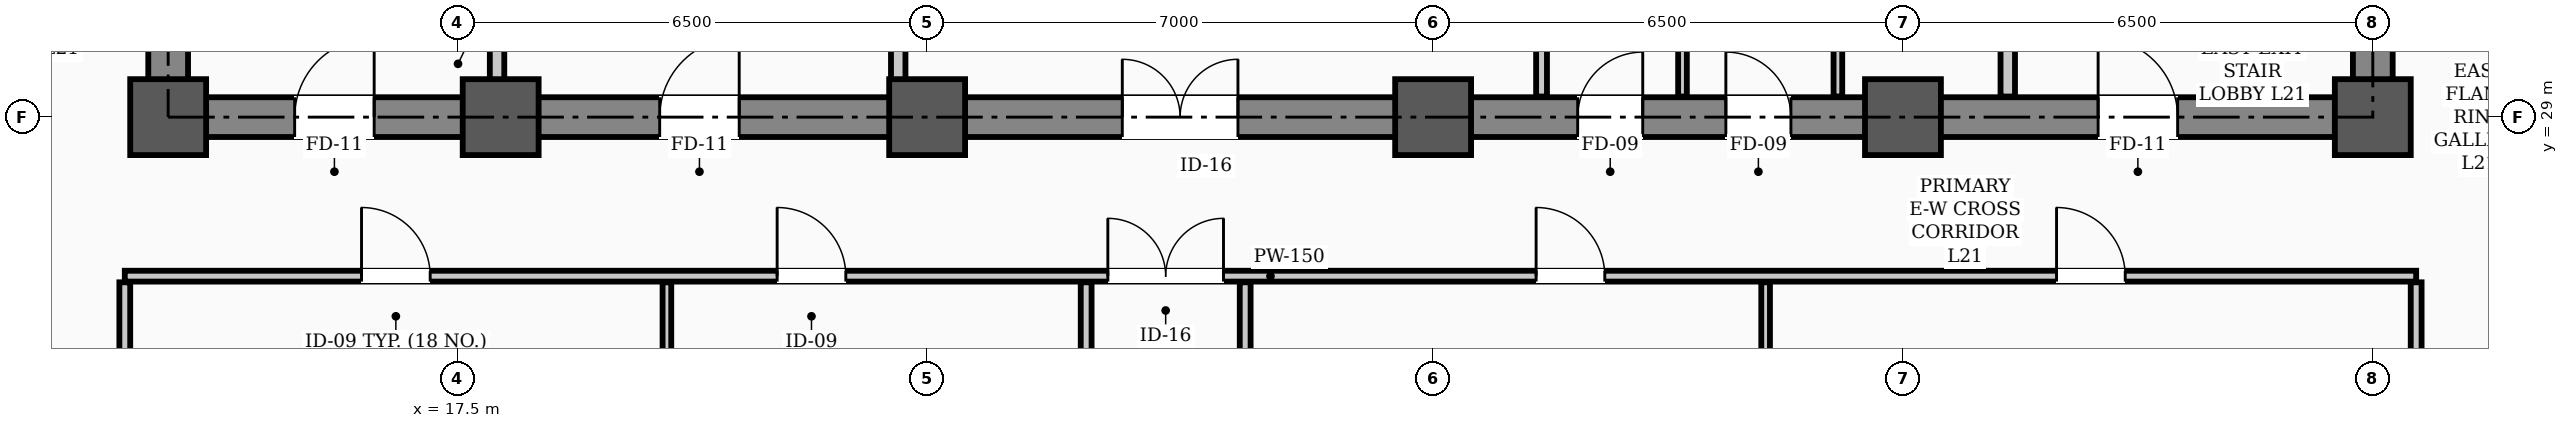
"""IFC4 building model, lengths in metres.
Left out: names, types, materials, properties, quantities, classifications, styles, units other than length and angle.
Written with IfcOpenShell. Run it as: python <this file> out.ifc"""

import sys

from ifc_helpers import new_model, si_unit, direction, frame, frame_2d, origin, origin_2d, place, context, subcontext, project, spatial, rectangle, hollow_rectangle, extrude, element, fill, save


model = new_model("IFC4")
c1 = context("Model", 3, precision=1e-05, world=origin(), true_north=direction((0.0, 1.0)))
c2 = subcontext(c1, "Body", "Model", "MODEL_VIEW")
j1 = project(units=[si_unit("LENGTHUNIT", "METRE"), si_unit("PLANEANGLEUNIT", "RADIAN")], contexts=[c1])
p1 = place(None, origin())
s1 = spatial("IfcSite", under=j1, at=p1, CompositionType="ELEMENT")
p2 = place(p1, origin())
s2 = spatial("IfcBuilding", under=s1, at=p2, CompositionType="ELEMENT")
p3 = place(p2, frame((0.0, 0.0, 85.0)))
s3 = spatial("IfcBuildingStorey", under=s2, at=p3, CompositionType="ELEMENT", Elevation=85.0)
for number, where, z_axis, x_axis in (
    (1, (13.5, 29.0, 0.0), (0.0, 0.0, 1.0), (1.0, 0.0, 0.0)),
    (2, (18.1, 29.0, 0.0), (0.0, 0.0, 1.0), (1.0, 0.0, 0.0)),
    (3, (24.0, 29.0, 0.0), (0.0, 0.0, 1.0), (1.0, 0.0, 0.0)),
    (4, (31.0, 29.0, 0.0), (0.0, 0.0, 1.0), (1.0, 0.0, 0.0)),
    (5, (37.5, 29.0, 0.0), (0.0, 0.0, 1.0), (1.0, 0.0, 0.0)),
    (6, (44.0, 29.0, 0.0), (0.0, 0.0, 1.0), (1.0, 0.0, 0.0)),
):
    element("IfcColumn", number, at=place(p3, frame(where, z_axis=z_axis, x_axis=x_axis)), inside=s3, PredefinedType="COLUMN", context=c2, shape_type="SweptSolid", body=[
        extrude(hollow_rectangle(XDim=1.05, YDim=1.05, WallThickness=0.038, InnerFilletRadius=0.019, OuterFilletRadius=0.057, at=origin_2d()), origin(), (0.0, 0.0, 1.0), 3.9),
    ])
p4 = place(p3, frame((13.5, 29.0, 0.0), z_axis=(0.0, 0.0, 1.0), x_axis=(1.0, 0.0, 0.0)))
e7 = element("IfcWall", 7, at=p4, inside=s3, PredefinedType="SHEAR", context=c2, shape_type="SweptSolid", body=[
    extrude(rectangle(XDim=30.5, YDim=0.55, at=frame_2d((15.25, 0.0))), origin(), (0.0, 0.0, 1.0), 3.72),
])
p5 = place(p4, frame((1.75, 0.0, 0.0)))
e8 = element("IfcOpeningElement", 8, at=p5, cuts=e7, PredefinedType="OPENING", context=c2, shape_type="SweptSolid", body=[
    extrude(rectangle(XDim=1.1, YDim=2.08, at=frame_2d((0.55, 1.04))), frame((0.0, 0.285, 0.0), z_axis=(0.0, -1.0, 0.0), x_axis=(1.0, 0.0, 0.0)), (0.0, 0.0, 1.0), 0.57),
])
p6 = place(p4, frame((26.7, 0.0, 0.0)))
e9 = element("IfcOpeningElement", 9, at=p6, cuts=e7, PredefinedType="OPENING", context=c2, shape_type="SweptSolid", body=[
    extrude(rectangle(XDim=1.1, YDim=2.08, at=frame_2d((0.55, 1.04))), frame((0.0, 0.285, 0.0), z_axis=(0.0, -1.0, 0.0), x_axis=(1.0, 0.0, 0.0)), (0.0, 0.0, 1.0), 0.57),
])
p7 = place(p4, frame((6.8, 0.0, 0.0)))
e10 = element("IfcOpeningElement", 10, at=p7, cuts=e7, PredefinedType="OPENING", context=c2, shape_type="SweptSolid", body=[
    extrude(rectangle(XDim=1.1, YDim=2.08, at=frame_2d((0.55, 1.04))), frame((0.0, 0.285, 0.0), z_axis=(0.0, -1.0, 0.0), x_axis=(1.0, 0.0, 0.0)), (0.0, 0.0, 1.0), 0.57),
])
p8 = place(p4, frame((13.2, 0.0, 0.0)))
e11 = element("IfcOpeningElement", 11, at=p8, cuts=e7, PredefinedType="OPENING", context=c2, shape_type="SweptSolid", body=[
    extrude(rectangle(XDim=1.6, YDim=2.08, at=frame_2d((0.8, 1.04))), frame((0.0, 0.285, 0.0), z_axis=(0.0, -1.0, 0.0), x_axis=(1.0, 0.0, 0.0)), (0.0, 0.0, 1.0), 0.57),
])
p9 = place(p4, frame((19.5, 0.0, 0.0)))
e12 = element("IfcOpeningElement", 12, at=p9, cuts=e7, PredefinedType="OPENING", context=c2, shape_type="SweptSolid", body=[
    extrude(rectangle(XDim=0.9, YDim=2.08, at=frame_2d((0.45, 1.04))), frame((0.0, 0.285, 0.0), z_axis=(0.0, -1.0, 0.0), x_axis=(1.0, 0.0, 0.0)), (0.0, 0.0, 1.0), 0.57),
])
p10 = place(p4, frame((21.55, 0.0, 0.0)))
e13 = element("IfcOpeningElement", 13, at=p10, cuts=e7, PredefinedType="OPENING", context=c2, shape_type="SweptSolid", body=[
    extrude(rectangle(XDim=0.9, YDim=2.08, at=frame_2d((0.45, 1.04))), frame((0.0, 0.285, 0.0), z_axis=(0.0, -1.0, 0.0), x_axis=(1.0, 0.0, 0.0)), (0.0, 0.0, 1.0), 0.57),
])
for number, where, z_axis, x_axis in (
    (14, (13.5, 29.35, 0.0), (0.0, 0.0, 1.0), (0.0, 1.0, 0.0)),
    (15, (44.0, 29.35, 0.0), (0.0, 0.0, 1.0), (0.0, 1.0, 0.0)),
):
    element("IfcWall", number, at=place(p3, frame(where, z_axis=z_axis, x_axis=x_axis)), inside=s3, PredefinedType="SHEAR", context=c2, shape_type="SweptSolid", body=[
        extrude(rectangle(XDim=8.6, YDim=0.55, at=frame_2d((4.3, 0.0))), origin(), (0.0, 0.0, 1.0), 3.72),
    ])
p11 = place(p3, frame((12.9, 26.8, 0.0), z_axis=(0.0, 0.0, 1.0), x_axis=(1.0, 0.0, 0.0)))
e16 = element("IfcWall", 16, at=p11, inside=s3, PredefinedType="PARTITIONING", context=c2, shape_type="SweptSolid", body=[
    extrude(rectangle(XDim=31.7, YDim=0.15, at=frame_2d((15.85, 0.0))), origin(), (0.0, 0.0, 1.0), 3.1),
])
p12 = place(p11, frame((13.6, 0.0, 0.0)))
e17 = element("IfcOpeningElement", 17, at=p12, cuts=e16, PredefinedType="OPENING", context=c2, shape_type="SweptSolid", body=[
    extrude(rectangle(XDim=1.6, YDim=2.08, at=frame_2d((0.8, 1.04))), frame((0.0, 0.085, 0.0), z_axis=(0.0, -1.0, 0.0), x_axis=(1.0, 0.0, 0.0)), (0.0, 0.0, 1.0), 0.17),
])
p13 = place(p11, frame((3.275, 0.0, 0.0)))
e18 = element("IfcOpeningElement", 18, at=p13, cuts=e16, PredefinedType="OPENING", context=c2, shape_type="SweptSolid", body=[
    extrude(rectangle(XDim=0.95, YDim=2.08, at=frame_2d((0.475, 1.04))), frame((0.0, 0.085, 0.0), z_axis=(0.0, -1.0, 0.0), x_axis=(1.0, 0.0, 0.0)), (0.0, 0.0, 1.0), 0.17),
])
p14 = place(p11, frame((9.025, 0.0, 0.0)))
e19 = element("IfcOpeningElement", 19, at=p14, cuts=e16, PredefinedType="OPENING", context=c2, shape_type="SweptSolid", body=[
    extrude(rectangle(XDim=0.95, YDim=2.08, at=frame_2d((0.475, 1.04))), frame((0.0, 0.085, 0.0), z_axis=(0.0, -1.0, 0.0), x_axis=(1.0, 0.0, 0.0)), (0.0, 0.0, 1.0), 0.17),
])
p15 = place(p11, frame((19.525, 0.0, 0.0)))
e20 = element("IfcOpeningElement", 20, at=p15, cuts=e16, PredefinedType="OPENING", context=c2, shape_type="SweptSolid", body=[
    extrude(rectangle(XDim=0.95, YDim=2.08, at=frame_2d((0.475, 1.04))), frame((0.0, 0.085, 0.0), z_axis=(0.0, -1.0, 0.0), x_axis=(1.0, 0.0, 0.0)), (0.0, 0.0, 1.0), 0.17),
])
p16 = place(p11, frame((26.725, 0.0, 0.0)))
e21 = element("IfcOpeningElement", 21, at=p16, cuts=e16, PredefinedType="OPENING", context=c2, shape_type="SweptSolid", body=[
    extrude(rectangle(XDim=0.95, YDim=2.08, at=frame_2d((0.475, 1.04))), frame((0.0, 0.085, 0.0), z_axis=(0.0, -1.0, 0.0), x_axis=(1.0, 0.0, 0.0)), (0.0, 0.0, 1.0), 0.17),
])
for number, where, z_axis, x_axis in (
    (22, (18.05, 29.285, 0.0), (0.0, 0.0, 1.0), (0.0, 1.0, 0.0)),
    (23, (38.95, 29.285, 0.0), (0.0, 0.0, 1.0), (0.0, 1.0, 0.0)),
):
    element("IfcWall", number, at=place(p3, frame(where, z_axis=z_axis, x_axis=x_axis)), inside=s3, PredefinedType="STANDARD", context=c2, shape_type="SweptSolid", body=[
        extrude(rectangle(XDim=1.015, YDim=0.2, at=frame_2d((0.508, 0.0))), origin(), (0.0, 0.0, 1.0), 3.3),
    ])
p17 = place(p3, frame((23.6, 29.285, 0.0), z_axis=(0.0, 0.0, 1.0), x_axis=(0.0, 1.0, 0.0)))
e24 = element("IfcWall", 24, at=p17, inside=s3, PredefinedType="STANDARD", context=c2, shape_type="SweptSolid", body=[
    extrude(rectangle(XDim=5.415, YDim=0.2, at=frame_2d((2.708, 0.0))), origin(), (0.0, 0.0, 1.0), 3.1),
])
p18 = place(p3, frame((32.5, 29.285, 0.0), z_axis=(0.0, 0.0, 1.0), x_axis=(0.0, 1.0, 0.0)))
e25 = element("IfcWall", 25, at=p18, inside=s3, PredefinedType="PARTITIONING", context=c2, shape_type="SweptSolid", body=[
    extrude(rectangle(XDim=2.48, YDim=0.15, at=frame_2d((1.24, 0.0))), origin(), (0.0, 0.0, 1.0), 3.3),
])
for number, where, z_axis, x_axis in (
    (26, (36.6, 29.285, 0.0), (0.0, 0.0, 1.0), (0.0, 1.0, 0.0)),
    (27, (34.45, 29.285, 0.0), (0.0, 0.0, 1.0), (0.0, 1.0, 0.0)),
):
    element("IfcWall", number, at=place(p3, frame(where, z_axis=z_axis, x_axis=x_axis)), inside=s3, PredefinedType="PARTITIONING", context=c2, shape_type="SweptSolid", body=[
        extrude(rectangle(XDim=2.48, YDim=0.12, at=frame_2d((1.24, 0.0))), origin(), (0.0, 0.0, 1.0), 3.3),
    ])
for number, where, z_axis, x_axis in (
    (28, (26.2, 19.335, 0.0), (0.0, 0.0, 1.0), (0.0, 1.0, 0.0)),
    (29, (28.4, 19.335, 0.0), (0.0, 0.0, 1.0), (0.0, 1.0, 0.0)),
    (30, (12.9, 19.335, 0.0), (0.0, 0.0, 1.0), (0.0, 1.0, 0.0)),
    (31, (44.6, 19.335, 0.0), (0.0, 0.0, 1.0), (0.0, 1.0, 0.0)),
):
    element("IfcWall", number, at=place(p3, frame(where, z_axis=z_axis, x_axis=x_axis)), inside=s3, PredefinedType="PARTITIONING", context=c2, shape_type="SweptSolid", body=[
        extrude(rectangle(XDim=7.38, YDim=0.15, at=frame_2d((3.69, 0.0))), origin(), (0.0, 0.0, 1.0), 3.0),
    ])
for number, where, z_axis, x_axis in (
    (32, (20.4, 19.335, 0.0), (0.0, 0.0, 1.0), (0.0, 1.0, 0.0)),
    (33, (35.6, 19.335, 0.0), (0.0, 0.0, 1.0), (0.0, 1.0, 0.0)),
):
    element("IfcWall", number, at=place(p3, frame(where, z_axis=z_axis, x_axis=x_axis)), inside=s3, PredefinedType="PARTITIONING", context=c2, shape_type="SweptSolid", body=[
        extrude(rectangle(XDim=7.38, YDim=0.12, at=frame_2d((3.69, 0.0))), origin(), (0.0, 0.0, 1.0), 3.0),
    ])
p19 = place(p5, origin())
e34 = element("IfcDoor", 34, at=p19, inside=s3, OperationType="SINGLE_SWING_RIGHT", PredefinedType="DOOR", context=c2, shape_type="SweptSolid", body=[
    extrude(rectangle(XDim=1.1, YDim=2.08, at=frame_2d((0.55, 1.04))), frame((0.0, 0.025, 0.0), z_axis=(0.0, -1.0, 0.0), x_axis=(1.0, 0.0, 0.0)), (0.0, 0.0, 1.0), 0.05),
])
fill(e8, e34)
p20 = place(p6, origin())
e35 = element("IfcDoor", 35, at=p20, inside=s3, OperationType="SINGLE_SWING_LEFT", PredefinedType="DOOR", context=c2, shape_type="SweptSolid", body=[
    extrude(rectangle(XDim=1.1, YDim=2.08, at=frame_2d((0.55, 1.04))), frame((0.0, 0.025, 0.0), z_axis=(0.0, -1.0, 0.0), x_axis=(1.0, 0.0, 0.0)), (0.0, 0.0, 1.0), 0.05),
])
fill(e9, e35)
p21 = place(p7, origin())
e36 = element("IfcDoor", 36, at=p21, inside=s3, OperationType="SINGLE_SWING_RIGHT", PredefinedType="DOOR", context=c2, shape_type="SweptSolid", body=[
    extrude(rectangle(XDim=1.1, YDim=2.08, at=frame_2d((0.55, 1.04))), frame((0.0, 0.025, 0.0), z_axis=(0.0, -1.0, 0.0), x_axis=(1.0, 0.0, 0.0)), (0.0, 0.0, 1.0), 0.05),
])
fill(e10, e36)
p22 = place(p8, origin())
e37 = element("IfcDoor", 37, at=p22, inside=s3, OperationType="DOUBLE_DOOR_SINGLE_SWING", PredefinedType="DOOR", context=c2, shape_type="SweptSolid", body=[
    extrude(rectangle(XDim=1.6, YDim=2.08, at=frame_2d((0.8, 1.04))), frame((0.0, 0.025, 0.0), z_axis=(0.0, -1.0, 0.0), x_axis=(1.0, 0.0, 0.0)), (0.0, 0.0, 1.0), 0.05),
])
fill(e11, e37)
p23 = place(p9, origin())
e38 = element("IfcDoor", 38, at=p23, inside=s3, OperationType="SINGLE_SWING_RIGHT", PredefinedType="DOOR", context=c2, shape_type="SweptSolid", body=[
    extrude(rectangle(XDim=0.9, YDim=2.08, at=frame_2d((0.45, 1.04))), frame((0.0, 0.025, 0.0), z_axis=(0.0, -1.0, 0.0), x_axis=(1.0, 0.0, 0.0)), (0.0, 0.0, 1.0), 0.05),
])
fill(e12, e38)
p24 = place(p10, origin())
e39 = element("IfcDoor", 39, at=p24, inside=s3, OperationType="SINGLE_SWING_LEFT", PredefinedType="DOOR", context=c2, shape_type="SweptSolid", body=[
    extrude(rectangle(XDim=0.9, YDim=2.08, at=frame_2d((0.45, 1.04))), frame((0.0, 0.025, 0.0), z_axis=(0.0, -1.0, 0.0), x_axis=(1.0, 0.0, 0.0)), (0.0, 0.0, 1.0), 0.05),
])
fill(e13, e39)
p25 = place(p12, origin())
e40 = element("IfcDoor", 40, at=p25, inside=s3, OperationType="DOUBLE_DOOR_SINGLE_SWING", PredefinedType="DOOR", context=c2, shape_type="SweptSolid", body=[
    extrude(rectangle(XDim=1.6, YDim=2.08, at=frame_2d((0.8, 1.04))), frame((0.0, 0.025, 0.0), z_axis=(0.0, -1.0, 0.0), x_axis=(1.0, 0.0, 0.0)), (0.0, 0.0, 1.0), 0.05),
])
fill(e17, e40)
p26 = place(p13, origin())
e41 = element("IfcDoor", 41, at=p26, inside=s3, OperationType="SINGLE_SWING_LEFT", PredefinedType="DOOR", context=c2, shape_type="SweptSolid", body=[
    extrude(rectangle(XDim=0.95, YDim=2.08, at=frame_2d((0.475, 1.04))), frame((0.0, 0.025, 0.0), z_axis=(0.0, -1.0, 0.0), x_axis=(1.0, 0.0, 0.0)), (0.0, 0.0, 1.0), 0.05),
])
fill(e18, e41)
p27 = place(p14, origin())
e42 = element("IfcDoor", 42, at=p27, inside=s3, OperationType="SINGLE_SWING_LEFT", PredefinedType="DOOR", context=c2, shape_type="SweptSolid", body=[
    extrude(rectangle(XDim=0.95, YDim=2.08, at=frame_2d((0.475, 1.04))), frame((0.0, 0.025, 0.0), z_axis=(0.0, -1.0, 0.0), x_axis=(1.0, 0.0, 0.0)), (0.0, 0.0, 1.0), 0.05),
])
fill(e19, e42)
p28 = place(p15, origin())
e43 = element("IfcDoor", 43, at=p28, inside=s3, OperationType="SINGLE_SWING_LEFT", PredefinedType="DOOR", context=c2, shape_type="SweptSolid", body=[
    extrude(rectangle(XDim=0.95, YDim=2.08, at=frame_2d((0.475, 1.04))), frame((0.0, 0.025, 0.0), z_axis=(0.0, -1.0, 0.0), x_axis=(1.0, 0.0, 0.0)), (0.0, 0.0, 1.0), 0.05),
])
fill(e20, e43)
p29 = place(p16, origin())
e44 = element("IfcDoor", 44, at=p29, inside=s3, OperationType="SINGLE_SWING_LEFT", PredefinedType="DOOR", context=c2, shape_type="SweptSolid", body=[
    extrude(rectangle(XDim=0.95, YDim=2.08, at=frame_2d((0.475, 1.04))), frame((0.0, 0.025, 0.0), z_axis=(0.0, -1.0, 0.0), x_axis=(1.0, 0.0, 0.0)), (0.0, 0.0, 1.0), 0.05),
])
fill(e21, e44)
save(model, sys.argv[1])
